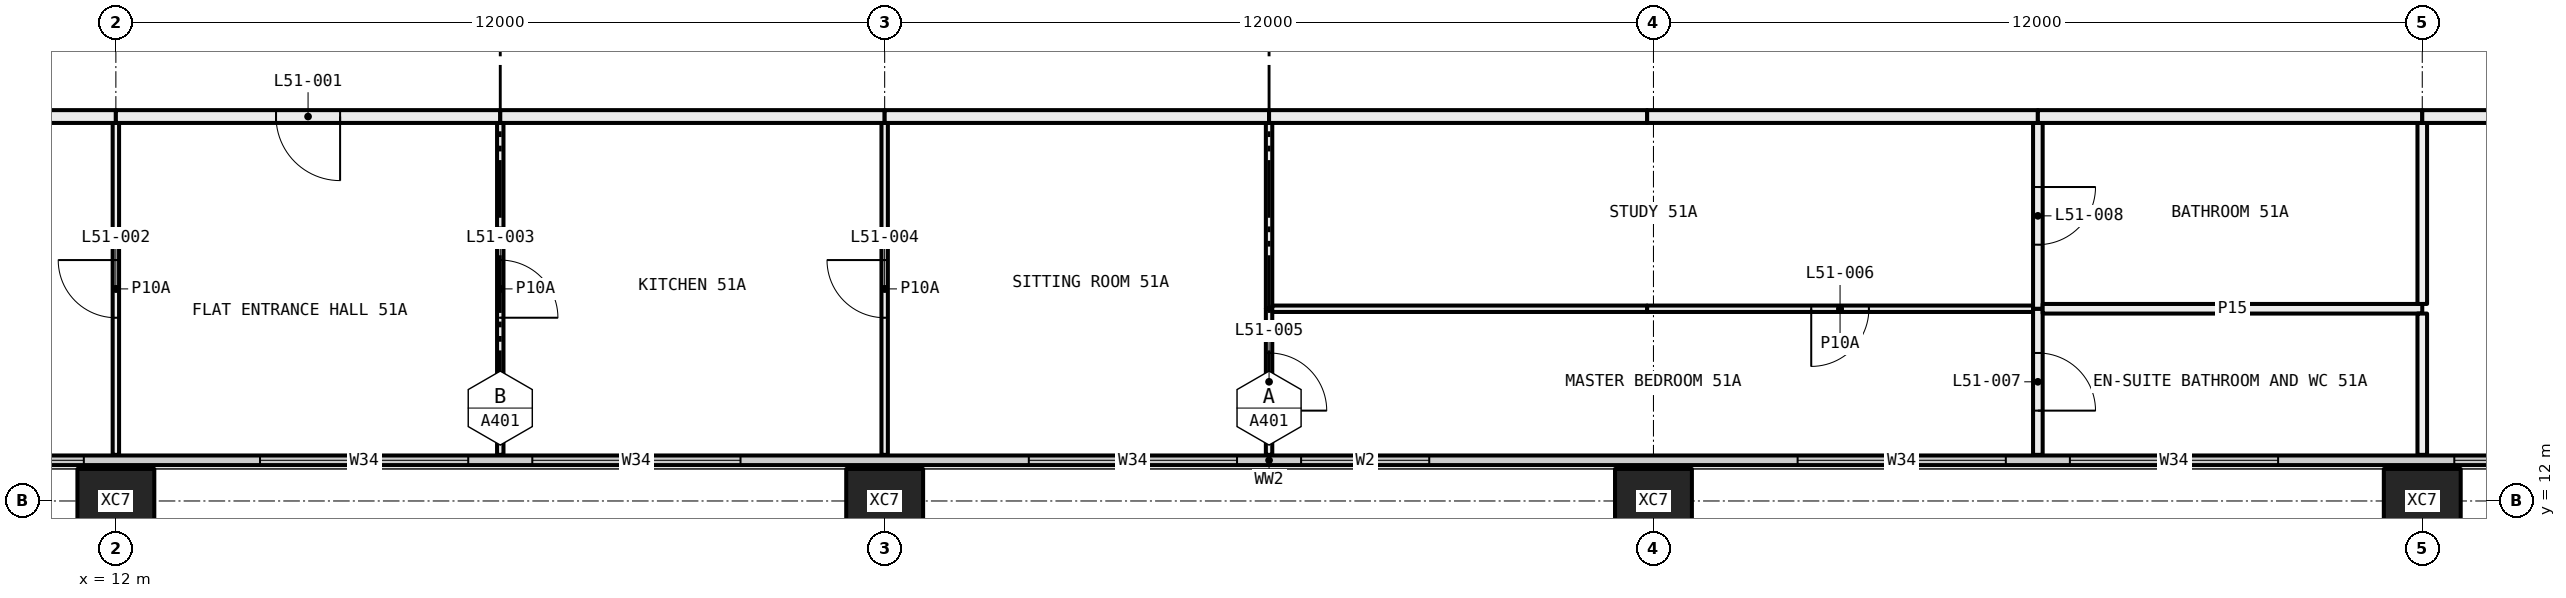
"""IFC4 building model, lengths in metres.
Left out: names, types, materials, properties, quantities, classifications, styles, units other than length and angle.
Written with IfcOpenShell. Run it as: python <this file> out.ifc"""

import sys

from ifc_helpers import new_model, si_unit, direction, frame, frame_2d, origin, origin_2d, place, context, subcontext, project, spatial, rectangle, hollow_rectangle, extrude, element, fill, save


model = new_model("IFC4")
c1 = context("Model", 3, precision=1e-05, world=origin(), true_north=direction((0.0, 1.0)))
c2 = subcontext(c1, "Body", "Model", "MODEL_VIEW")
j1 = project(units=[si_unit("LENGTHUNIT", "METRE"), si_unit("PLANEANGLEUNIT", "RADIAN")], contexts=[c1])
p1 = place(None, origin())
s1 = spatial("IfcSite", under=j1, at=p1, CompositionType="ELEMENT")
p2 = place(p1, origin())
s2 = spatial("IfcBuilding", under=s1, at=p2, CompositionType="ELEMENT")
p3 = place(p2, frame((0.0, 0.0, 192.75)))
s3 = spatial("IfcBuildingStorey", under=s2, at=p3, CompositionType="ELEMENT", Elevation=192.75)
for number, where, z_axis, x_axis in (
    (1, (12.0, 12.0, -0.4), (0.0, 0.0, 1.0), (1.0, 0.0, 0.0)),
    (2, (24.0, 12.0, -0.4), (0.0, 0.0, 1.0), (1.0, 0.0, 0.0)),
    (3, (36.0, 12.0, -0.4), (0.0, 0.0, 1.0), (1.0, 0.0, 0.0)),
    (4, (48.0, 12.0, -0.4), (0.0, 0.0, 1.0), (1.0, 0.0, 0.0)),
):
    element("IfcColumn", number, at=place(p3, frame(where, z_axis=z_axis, x_axis=x_axis)), inside=s3, PredefinedType="COLUMN", context=c2, shape_type="SweptSolid", body=[
        extrude(hollow_rectangle(XDim=1.2, YDim=1.0, WallThickness=0.045, at=origin_2d()), origin(), (0.0, 0.0, 1.0), 3.45),
    ])
p4 = place(p3, frame((6.56, 12.635, 0.0), z_axis=(0.0, 0.0, 1.0), x_axis=(1.0, 0.0, 0.0)))
e5 = element("IfcWall", 5, at=p4, inside=s3, PredefinedType="ELEMENTEDWALL", context=c2, shape_type="SweptSolid", body=[
    extrude(rectangle(XDim=46.88, YDim=0.15, at=frame_2d((23.44, 0.0))), origin(), (0.0, 0.0, 1.0), 3.05),
])
p5 = place(p4, frame((0.44, 0.0, 0.45)))
e6 = element("IfcOpeningElement", 6, at=p5, cuts=e5, PredefinedType="OPENING", context=c2, shape_type="SweptSolid", body=[
    extrude(rectangle(XDim=4.5, YDim=2.55, at=frame_2d((2.25, 1.275))), frame((0.0, 0.085, 0.0), z_axis=(0.0, -1.0, 0.0), x_axis=(1.0, 0.0, 0.0)), (0.0, 0.0, 1.0), 0.17),
])
p6 = place(p4, frame((7.69, 0.0, 0.45)))
e7 = element("IfcOpeningElement", 7, at=p6, cuts=e5, PredefinedType="OPENING", context=c2, shape_type="SweptSolid", body=[
    extrude(rectangle(XDim=3.25, YDim=2.55, at=frame_2d((1.625, 1.275))), frame((0.0, 0.085, 0.0), z_axis=(0.0, -1.0, 0.0), x_axis=(1.0, 0.0, 0.0)), (0.0, 0.0, 1.0), 0.17),
])
p7 = place(p4, frame((11.94, 0.0, 0.45)))
e8 = element("IfcOpeningElement", 8, at=p7, cuts=e5, PredefinedType="OPENING", context=c2, shape_type="SweptSolid", body=[
    extrude(rectangle(XDim=3.25, YDim=2.55, at=frame_2d((1.625, 1.275))), frame((0.0, 0.085, 0.0), z_axis=(0.0, -1.0, 0.0), x_axis=(1.0, 0.0, 0.0)), (0.0, 0.0, 1.0), 0.17),
])
p8 = place(p4, frame((19.69, 0.0, 0.45)))
e9 = element("IfcOpeningElement", 9, at=p8, cuts=e5, PredefinedType="OPENING", context=c2, shape_type="SweptSolid", body=[
    extrude(rectangle(XDim=3.25, YDim=2.55, at=frame_2d((1.625, 1.275))), frame((0.0, 0.085, 0.0), z_axis=(0.0, -1.0, 0.0), x_axis=(1.0, 0.0, 0.0)), (0.0, 0.0, 1.0), 0.17),
])
p9 = place(p4, frame((23.94, 0.0, 0.45)))
e10 = element("IfcOpeningElement", 10, at=p9, cuts=e5, PredefinedType="OPENING", context=c2, shape_type="SweptSolid", body=[
    extrude(rectangle(XDim=2.0, YDim=2.55, at=frame_2d((1.0, 1.275))), frame((0.0, 0.085, 0.0), z_axis=(0.0, -1.0, 0.0), x_axis=(1.0, 0.0, 0.0)), (0.0, 0.0, 1.0), 0.17),
])
p10 = place(p4, frame((31.69, 0.0, 0.45)))
e11 = element("IfcOpeningElement", 11, at=p10, cuts=e5, PredefinedType="OPENING", context=c2, shape_type="SweptSolid", body=[
    extrude(rectangle(XDim=3.25, YDim=2.55, at=frame_2d((1.625, 1.275))), frame((0.0, 0.085, 0.0), z_axis=(0.0, -1.0, 0.0), x_axis=(1.0, 0.0, 0.0)), (0.0, 0.0, 1.0), 0.17),
])
p11 = place(p4, frame((35.94, 0.0, 0.45)))
e12 = element("IfcOpeningElement", 12, at=p11, cuts=e5, PredefinedType="OPENING", context=c2, shape_type="SweptSolid", body=[
    extrude(rectangle(XDim=3.25, YDim=2.55, at=frame_2d((1.625, 1.275))), frame((0.0, 0.085, 0.0), z_axis=(0.0, -1.0, 0.0), x_axis=(1.0, 0.0, 0.0)), (0.0, 0.0, 1.0), 0.17),
])
p12 = place(p4, frame((41.94, 0.0, 0.45)))
e13 = element("IfcOpeningElement", 13, at=p12, cuts=e5, PredefinedType="OPENING", context=c2, shape_type="SweptSolid", body=[
    extrude(rectangle(XDim=4.5, YDim=2.55, at=frame_2d((2.25, 1.275))), frame((0.0, 0.085, 0.0), z_axis=(0.0, -1.0, 0.0), x_axis=(1.0, 0.0, 0.0)), (0.0, 0.0, 1.0), 0.17),
])
p13 = place(p3, frame((12.0, 12.72, 0.0), z_axis=(0.0, 0.0, 1.0), x_axis=(0.0, 1.0, 0.0)))
e14 = element("IfcWall", 14, at=p13, inside=s3, PredefinedType="PARTITIONING", context=c2, shape_type="SweptSolid", body=[
    extrude(rectangle(XDim=5.18, YDim=0.1, at=frame_2d((2.59, 0.0))), origin(), (0.0, 0.0, 1.0), 3.05),
])
p14 = place(p13, frame((2.14, 0.0, 0.0)))
e15 = element("IfcOpeningElement", 15, at=p14, cuts=e14, PredefinedType="OPENING", context=c2, shape_type="SweptSolid", body=[
    extrude(rectangle(XDim=0.9, YDim=2.1, at=frame_2d((0.45, 1.05))), frame((0.0, 0.06, 0.0), z_axis=(0.0, -1.0, 0.0), x_axis=(1.0, 0.0, 0.0)), (0.0, 0.0, 1.0), 0.12),
])
p15 = place(p3, frame((12.0, 18.0, 0.0), z_axis=(0.0, 0.0, 1.0), x_axis=(-1.0, 0.0, 0.0)))
e16 = element("IfcWall", 16, at=p15, inside=s3, PredefinedType="PARTITIONING", context=c2, shape_type="SweptSolid", body=[
    extrude(rectangle(XDim=1.9, YDim=0.2, at=frame_2d((0.95, 0.0))), origin(), (0.0, 0.0, 1.0), 3.05),
])
p16 = place(p3, frame((18.0, 12.72, 0.0), z_axis=(0.0, 0.0, 1.0), x_axis=(0.0, 1.0, 0.0)))
e17 = element("IfcWall", 17, at=p16, inside=s3, PredefinedType="PARTITIONING", context=c2, shape_type="SweptSolid", body=[
    extrude(rectangle(XDim=5.18, YDim=0.1, at=frame_2d((2.59, 0.0))), origin(), (0.0, 0.0, 1.0), 3.05),
])
p17 = place(p16, frame((2.14, 0.0, 0.0)))
e18 = element("IfcOpeningElement", 18, at=p17, cuts=e17, PredefinedType="OPENING", context=c2, shape_type="SweptSolid", body=[
    extrude(rectangle(XDim=0.9, YDim=2.1, at=frame_2d((0.45, 1.05))), frame((0.0, 0.06, 0.0), z_axis=(0.0, -1.0, 0.0), x_axis=(1.0, 0.0, 0.0)), (0.0, 0.0, 1.0), 0.12),
])
p18 = place(p3, frame((18.0, 18.0, 0.0), z_axis=(0.0, 0.0, 1.0), x_axis=(-1.0, 0.0, 0.0)))
e19 = element("IfcWall", 19, at=p18, inside=s3, PredefinedType="PARTITIONING", context=c2, shape_type="SweptSolid", body=[
    extrude(rectangle(XDim=6.0, YDim=0.2, at=frame_2d((3.0, 0.0))), origin(), (0.0, 0.0, 1.0), 3.05),
])
p19 = place(p18, frame((2.5, 0.0, 0.0)))
e20 = element("IfcOpeningElement", 20, at=p19, cuts=e19, PredefinedType="OPENING", context=c2, shape_type="SweptSolid", body=[
    extrude(rectangle(XDim=1.0, YDim=2.1, at=frame_2d((0.5, 1.05))), frame((0.0, 0.11, 0.0), z_axis=(0.0, -1.0, 0.0), x_axis=(1.0, 0.0, 0.0)), (0.0, 0.0, 1.0), 0.22),
])
p20 = place(p3, frame((24.0, 12.72, 0.0), z_axis=(0.0, 0.0, 1.0), x_axis=(0.0, 1.0, 0.0)))
e21 = element("IfcWall", 21, at=p20, inside=s3, PredefinedType="PARTITIONING", context=c2, shape_type="SweptSolid", body=[
    extrude(rectangle(XDim=5.18, YDim=0.1, at=frame_2d((2.59, 0.0))), origin(), (0.0, 0.0, 1.0), 3.05),
])
p21 = place(p20, frame((2.14, 0.0, 0.0)))
e22 = element("IfcOpeningElement", 22, at=p21, cuts=e21, PredefinedType="OPENING", context=c2, shape_type="SweptSolid", body=[
    extrude(rectangle(XDim=0.9, YDim=2.1, at=frame_2d((0.45, 1.05))), frame((0.0, 0.06, 0.0), z_axis=(0.0, -1.0, 0.0), x_axis=(1.0, 0.0, 0.0)), (0.0, 0.0, 1.0), 0.12),
])
p22 = place(p3, frame((24.0, 18.0, 0.0), z_axis=(0.0, 0.0, 1.0), x_axis=(-1.0, 0.0, 0.0)))
e23 = element("IfcWall", 23, at=p22, inside=s3, PredefinedType="PARTITIONING", context=c2, shape_type="SweptSolid", body=[
    extrude(rectangle(XDim=6.0, YDim=0.2, at=frame_2d((3.0, 0.0))), origin(), (0.0, 0.0, 1.0), 3.05),
])
p23 = place(p3, frame((30.0, 12.72, 0.0), z_axis=(0.0, 0.0, 1.0), x_axis=(0.0, 1.0, 0.0)))
e24 = element("IfcWall", 24, at=p23, inside=s3, PredefinedType="PARTITIONING", context=c2, shape_type="SweptSolid", body=[
    extrude(rectangle(XDim=2.28, YDim=0.1, at=frame_2d((1.14, 0.0))), origin(), (0.0, 0.0, 1.0), 3.05),
])
p24 = place(p23, frame((0.69, 0.0, 0.0)))
e25 = element("IfcOpeningElement", 25, at=p24, cuts=e24, PredefinedType="OPENING", context=c2, shape_type="SweptSolid", body=[
    extrude(rectangle(XDim=0.9, YDim=2.1, at=frame_2d((0.45, 1.05))), frame((0.0, 0.06, 0.0), z_axis=(0.0, -1.0, 0.0), x_axis=(1.0, 0.0, 0.0)), (0.0, 0.0, 1.0), 0.12),
])
p25 = place(p3, frame((30.0, 15.0, 0.0), z_axis=(0.0, 0.0, 1.0), x_axis=(0.0, 1.0, 0.0)))
e26 = element("IfcWall", 26, at=p25, inside=s3, PredefinedType="PARTITIONING", context=c2, shape_type="SweptSolid", body=[
    extrude(rectangle(XDim=2.9, YDim=0.1, at=frame_2d((1.45, 0.0))), origin(), (0.0, 0.0, 1.0), 3.05),
])
p26 = place(p3, frame((30.0, 18.0, 0.0), z_axis=(0.0, 0.0, 1.0), x_axis=(-1.0, 0.0, 0.0)))
e27 = element("IfcWall", 27, at=p26, inside=s3, PredefinedType="PARTITIONING", context=c2, shape_type="SweptSolid", body=[
    extrude(rectangle(XDim=6.0, YDim=0.2, at=frame_2d((3.0, 0.0))), origin(), (0.0, 0.0, 1.0), 3.05),
])
p27 = place(p3, frame((41.925, 15.0, 0.0), z_axis=(0.0, 0.0, 1.0), x_axis=(-1.0, 0.0, 0.0)))
e28 = element("IfcWall", 28, at=p27, inside=s3, PredefinedType="PARTITIONING", context=c2, shape_type="SweptSolid", body=[
    extrude(rectangle(XDim=6.025, YDim=0.1, at=frame_2d((3.013, 0.0))), origin(), (0.0, 0.0, 1.0), 2.45),
])
p28 = place(p27, frame((2.562, 0.0, 0.0)))
e29 = element("IfcOpeningElement", 29, at=p28, cuts=e28, PredefinedType="OPENING", context=c2, shape_type="SweptSolid", body=[
    extrude(rectangle(XDim=0.9, YDim=2.1, at=frame_2d((0.45, 1.05))), frame((0.0, 0.06, 0.0), z_axis=(0.0, -1.0, 0.0), x_axis=(1.0, 0.0, 0.0)), (0.0, 0.0, 1.0), 0.12),
])
p29 = place(p3, frame((35.9, 15.0, 0.0), z_axis=(0.0, 0.0, 1.0), x_axis=(-1.0, 0.0, 0.0)))
e30 = element("IfcWall", 30, at=p29, inside=s3, PredefinedType="PARTITIONING", context=c2, shape_type="SweptSolid", body=[
    extrude(rectangle(XDim=5.85, YDim=0.1, at=frame_2d((2.925, 0.0))), origin(), (0.0, 0.0, 1.0), 3.05),
])
p30 = place(p3, frame((42.0, 12.72, 0.0), z_axis=(0.0, 0.0, 1.0), x_axis=(0.0, 1.0, 0.0)))
e31 = element("IfcWall", 31, at=p30, inside=s3, PredefinedType="PARTITIONING", context=c2, shape_type="SweptSolid", body=[
    extrude(rectangle(XDim=2.28, YDim=0.15, at=frame_2d((1.14, 0.0))), origin(), (0.0, 0.0, 1.0), 3.05),
])
p31 = place(p30, frame((0.69, 0.0, 0.0)))
e32 = element("IfcOpeningElement", 32, at=p31, cuts=e31, PredefinedType="OPENING", context=c2, shape_type="SweptSolid", body=[
    extrude(rectangle(XDim=0.9, YDim=2.1, at=frame_2d((0.45, 1.05))), frame((0.0, 0.085, 0.0), z_axis=(0.0, -1.0, 0.0), x_axis=(1.0, 0.0, 0.0)), (0.0, 0.0, 1.0), 0.17),
])
p32 = place(p3, frame((42.0, 15.0, 0.0), z_axis=(0.0, 0.0, 1.0), x_axis=(0.0, 1.0, 0.0)))
e33 = element("IfcWall", 33, at=p32, inside=s3, PredefinedType="PARTITIONING", context=c2, shape_type="SweptSolid", body=[
    extrude(rectangle(XDim=2.9, YDim=0.15, at=frame_2d((1.45, 0.0))), origin(), (0.0, 0.0, 1.0), 3.05),
])
p33 = place(p32, frame((1.0, 0.0, 0.0)))
e34 = element("IfcOpeningElement", 34, at=p33, cuts=e33, PredefinedType="OPENING", context=c2, shape_type="SweptSolid", body=[
    extrude(rectangle(XDim=0.9, YDim=2.1, at=frame_2d((0.45, 1.05))), frame((0.0, 0.085, 0.0), z_axis=(0.0, -1.0, 0.0), x_axis=(1.0, 0.0, 0.0)), (0.0, 0.0, 1.0), 0.17),
])
p34 = place(p3, frame((42.0, 18.0, 0.0), z_axis=(0.0, 0.0, 1.0), x_axis=(-1.0, 0.0, 0.0)))
e35 = element("IfcWall", 35, at=p34, inside=s3, PredefinedType="PARTITIONING", context=c2, shape_type="SweptSolid", body=[
    extrude(rectangle(XDim=6.1, YDim=0.2, at=frame_2d((3.05, 0.0))), origin(), (0.0, 0.0, 1.0), 2.45),
])
p35 = place(p3, frame((35.9, 18.0, 0.0), z_axis=(0.0, 0.0, 1.0), x_axis=(-1.0, 0.0, 0.0)))
e36 = element("IfcWall", 36, at=p35, inside=s3, PredefinedType="PARTITIONING", context=c2, shape_type="SweptSolid", body=[
    extrude(rectangle(XDim=5.9, YDim=0.2, at=frame_2d((2.95, 0.0))), origin(), (0.0, 0.0, 1.0), 3.05),
])
p36 = place(p3, frame((48.0, 15.0, 0.0), z_axis=(0.0, 0.0, 1.0), x_axis=(-1.0, 0.0, 0.0)))
e37 = element("IfcWall", 37, at=p36, inside=s3, PredefinedType="PARTITIONING", context=c2, shape_type="SweptSolid", body=[
    extrude(rectangle(XDim=5.925, YDim=0.15, at=frame_2d((2.962, 0.0))), origin(), (0.0, 0.0, 1.0), 3.05),
])
p37 = place(p3, frame((48.0, 12.72, 0.0), z_axis=(0.0, 0.0, 1.0), x_axis=(0.0, 1.0, 0.0)))
e38 = element("IfcWall", 38, at=p37, inside=s3, PredefinedType="PARTITIONING", context=c2, shape_type="SweptSolid", body=[
    extrude(rectangle(XDim=2.205, YDim=0.15, at=frame_2d((1.103, 0.0))), origin(), (0.0, 0.0, 1.0), 3.05),
])
p38 = place(p3, frame((48.0, 15.075, 0.0), z_axis=(0.0, 0.0, 1.0), x_axis=(0.0, 1.0, 0.0)))
e39 = element("IfcWall", 39, at=p38, inside=s3, PredefinedType="PARTITIONING", context=c2, shape_type="SweptSolid", body=[
    extrude(rectangle(XDim=2.825, YDim=0.15, at=frame_2d((1.413, 0.0))), origin(), (0.0, 0.0, 1.0), 3.05),
])
p39 = place(p3, frame((48.0, 18.0, 0.0), z_axis=(0.0, 0.0, 1.0), x_axis=(-1.0, 0.0, 0.0)))
e40 = element("IfcWall", 40, at=p39, inside=s3, PredefinedType="PARTITIONING", context=c2, shape_type="SweptSolid", body=[
    extrude(rectangle(XDim=6.0, YDim=0.2, at=frame_2d((3.0, 0.0))), origin(), (0.0, 0.0, 1.0), 3.05),
])
p40 = place(p3, frame((53.28, 18.0, 0.0), z_axis=(0.0, 0.0, 1.0), x_axis=(-1.0, 0.0, 0.0)))
e41 = element("IfcWall", 41, at=p40, inside=s3, PredefinedType="PARTITIONING", context=c2, shape_type="SweptSolid", body=[
    extrude(rectangle(XDim=5.28, YDim=0.2, at=frame_2d((2.64, 0.0))), origin(), (0.0, 0.0, 1.0), 3.05),
])
p41 = place(p40, frame((2.19, 0.0, 0.0)))
e42 = element("IfcOpeningElement", 42, at=p41, cuts=e41, PredefinedType="OPENING", context=c2, shape_type="SweptSolid", body=[
    extrude(rectangle(XDim=0.9, YDim=2.1, at=frame_2d((0.45, 1.05))), frame((0.0, 0.11, 0.0), z_axis=(0.0, -1.0, 0.0), x_axis=(1.0, 0.0, 0.0)), (0.0, 0.0, 1.0), 0.22),
])
p42 = place(p5, origin())
e43 = element("IfcWindow", 43, at=p42, inside=s3, PartitioningType="SINGLE_PANEL", PredefinedType="WINDOW", context=c2, shape_type="SweptSolid", body=[
    extrude(rectangle(XDim=4.5, YDim=2.55, at=frame_2d((2.25, 1.275))), frame((0.0, 0.03, 0.0), z_axis=(0.0, -1.0, 0.0), x_axis=(1.0, 0.0, 0.0)), (0.0, 0.0, 1.0), 0.06),
])
fill(e6, e43)
p43 = place(p6, origin())
e44 = element("IfcWindow", 44, at=p43, inside=s3, PartitioningType="SINGLE_PANEL", PredefinedType="WINDOW", context=c2, shape_type="SweptSolid", body=[
    extrude(rectangle(XDim=3.25, YDim=2.55, at=frame_2d((1.625, 1.275))), frame((0.0, 0.03, 0.0), z_axis=(0.0, -1.0, 0.0), x_axis=(1.0, 0.0, 0.0)), (0.0, 0.0, 1.0), 0.06),
])
fill(e7, e44)
p44 = place(p7, origin())
e45 = element("IfcWindow", 45, at=p44, inside=s3, PartitioningType="SINGLE_PANEL", PredefinedType="WINDOW", context=c2, shape_type="SweptSolid", body=[
    extrude(rectangle(XDim=3.25, YDim=2.55, at=frame_2d((1.625, 1.275))), frame((0.0, 0.03, 0.0), z_axis=(0.0, -1.0, 0.0), x_axis=(1.0, 0.0, 0.0)), (0.0, 0.0, 1.0), 0.06),
])
fill(e8, e45)
p45 = place(p8, origin())
e46 = element("IfcWindow", 46, at=p45, inside=s3, PartitioningType="SINGLE_PANEL", PredefinedType="WINDOW", context=c2, shape_type="SweptSolid", body=[
    extrude(rectangle(XDim=3.25, YDim=2.55, at=frame_2d((1.625, 1.275))), frame((0.0, 0.03, 0.0), z_axis=(0.0, -1.0, 0.0), x_axis=(1.0, 0.0, 0.0)), (0.0, 0.0, 1.0), 0.06),
])
fill(e9, e46)
p46 = place(p9, origin())
e47 = element("IfcWindow", 47, at=p46, inside=s3, PartitioningType="SINGLE_PANEL", PredefinedType="WINDOW", context=c2, shape_type="SweptSolid", body=[
    extrude(rectangle(XDim=2.0, YDim=2.55, at=frame_2d((1.0, 1.275))), frame((0.0, 0.03, 0.0), z_axis=(0.0, -1.0, 0.0), x_axis=(1.0, 0.0, 0.0)), (0.0, 0.0, 1.0), 0.06),
])
fill(e10, e47)
p47 = place(p10, origin())
e48 = element("IfcWindow", 48, at=p47, inside=s3, PartitioningType="SINGLE_PANEL", PredefinedType="WINDOW", context=c2, shape_type="SweptSolid", body=[
    extrude(rectangle(XDim=3.25, YDim=2.55, at=frame_2d((1.625, 1.275))), frame((0.0, 0.03, 0.0), z_axis=(0.0, -1.0, 0.0), x_axis=(1.0, 0.0, 0.0)), (0.0, 0.0, 1.0), 0.06),
])
fill(e11, e48)
p48 = place(p11, origin())
e49 = element("IfcWindow", 49, at=p48, inside=s3, PartitioningType="SINGLE_PANEL", PredefinedType="WINDOW", context=c2, shape_type="SweptSolid", body=[
    extrude(rectangle(XDim=3.25, YDim=2.55, at=frame_2d((1.625, 1.275))), frame((0.0, 0.03, 0.0), z_axis=(0.0, -1.0, 0.0), x_axis=(1.0, 0.0, 0.0)), (0.0, 0.0, 1.0), 0.06),
])
fill(e12, e49)
p49 = place(p12, origin())
e50 = element("IfcWindow", 50, at=p49, inside=s3, PartitioningType="SINGLE_PANEL", PredefinedType="WINDOW", context=c2, shape_type="SweptSolid", body=[
    extrude(rectangle(XDim=4.5, YDim=2.55, at=frame_2d((2.25, 1.275))), frame((0.0, 0.03, 0.0), z_axis=(0.0, -1.0, 0.0), x_axis=(1.0, 0.0, 0.0)), (0.0, 0.0, 1.0), 0.06),
])
fill(e13, e50)
p50 = place(p19, origin())
e51 = element("IfcDoor", 51, at=p50, inside=s3, OperationType="SINGLE_SWING_RIGHT", PredefinedType="DOOR", context=c2, shape_type="SweptSolid", body=[
    extrude(rectangle(XDim=1.0, YDim=2.1, at=frame_2d((0.5, 1.05))), frame((0.0, 0.025, 0.0), z_axis=(0.0, -1.0, 0.0), x_axis=(1.0, 0.0, 0.0)), (0.0, 0.0, 1.0), 0.05),
])
fill(e20, e51)
p51 = place(p14, origin())
e52 = element("IfcDoor", 52, at=p51, inside=s3, OperationType="SINGLE_SWING_LEFT", PredefinedType="DOOR", context=c2, shape_type="SweptSolid", body=[
    extrude(rectangle(XDim=0.9, YDim=2.1, at=frame_2d((0.45, 1.05))), frame((0.0, 0.025, 0.0), z_axis=(0.0, -1.0, 0.0), x_axis=(1.0, 0.0, 0.0)), (0.0, 0.0, 1.0), 0.05),
])
fill(e15, e52)
p52 = place(p17, frame((0.9, 0.0, 0.0), x_axis=(-1.0, 0.0, 0.0)))
e53 = element("IfcDoor", 53, at=p52, inside=s3, OperationType="SINGLE_SWING_LEFT", PredefinedType="DOOR", context=c2, shape_type="SweptSolid", body=[
    extrude(rectangle(XDim=0.9, YDim=2.1, at=frame_2d((0.45, 1.05))), frame((0.0, 0.025, 0.0), z_axis=(0.0, -1.0, 0.0), x_axis=(1.0, 0.0, 0.0)), (0.0, 0.0, 1.0), 0.05),
])
fill(e18, e53)
p53 = place(p21, origin())
e54 = element("IfcDoor", 54, at=p53, inside=s3, OperationType="SINGLE_SWING_LEFT", PredefinedType="DOOR", context=c2, shape_type="SweptSolid", body=[
    extrude(rectangle(XDim=0.9, YDim=2.1, at=frame_2d((0.45, 1.05))), frame((0.0, 0.025, 0.0), z_axis=(0.0, -1.0, 0.0), x_axis=(1.0, 0.0, 0.0)), (0.0, 0.0, 1.0), 0.05),
])
fill(e22, e54)
p54 = place(p24, frame((0.9, 0.0, 0.0), x_axis=(-1.0, 0.0, 0.0)))
e55 = element("IfcDoor", 55, at=p54, inside=s3, OperationType="SINGLE_SWING_LEFT", PredefinedType="DOOR", context=c2, shape_type="SweptSolid", body=[
    extrude(rectangle(XDim=0.9, YDim=2.1, at=frame_2d((0.45, 1.05))), frame((0.0, 0.025, 0.0), z_axis=(0.0, -1.0, 0.0), x_axis=(1.0, 0.0, 0.0)), (0.0, 0.0, 1.0), 0.05),
])
fill(e25, e55)
p55 = place(p28, origin())
e56 = element("IfcDoor", 56, at=p55, inside=s3, OperationType="SINGLE_SWING_LEFT", PredefinedType="DOOR", context=c2, shape_type="SweptSolid", body=[
    extrude(rectangle(XDim=0.9, YDim=2.1, at=frame_2d((0.45, 1.05))), frame((0.0, 0.025, 0.0), z_axis=(0.0, -1.0, 0.0), x_axis=(1.0, 0.0, 0.0)), (0.0, 0.0, 1.0), 0.05),
])
fill(e29, e56)
p56 = place(p31, frame((0.9, 0.0, 0.0), x_axis=(-1.0, 0.0, 0.0)))
e57 = element("IfcDoor", 57, at=p56, inside=s3, OperationType="SINGLE_SWING_LEFT", PredefinedType="DOOR", context=c2, shape_type="SweptSolid", body=[
    extrude(rectangle(XDim=0.9, YDim=2.1, at=frame_2d((0.45, 1.05))), frame((0.0, 0.025, 0.0), z_axis=(0.0, -1.0, 0.0), x_axis=(1.0, 0.0, 0.0)), (0.0, 0.0, 1.0), 0.05),
])
fill(e32, e57)
p57 = place(p33, frame((0.9, 0.0, 0.0), x_axis=(-1.0, 0.0, 0.0)))
e58 = element("IfcDoor", 58, at=p57, inside=s3, OperationType="SINGLE_SWING_RIGHT", PredefinedType="DOOR", context=c2, shape_type="SweptSolid", body=[
    extrude(rectangle(XDim=0.9, YDim=2.1, at=frame_2d((0.45, 1.05))), frame((0.0, 0.025, 0.0), z_axis=(0.0, -1.0, 0.0), x_axis=(1.0, 0.0, 0.0)), (0.0, 0.0, 1.0), 0.05),
])
fill(e34, e58)
save(model, sys.argv[1])
